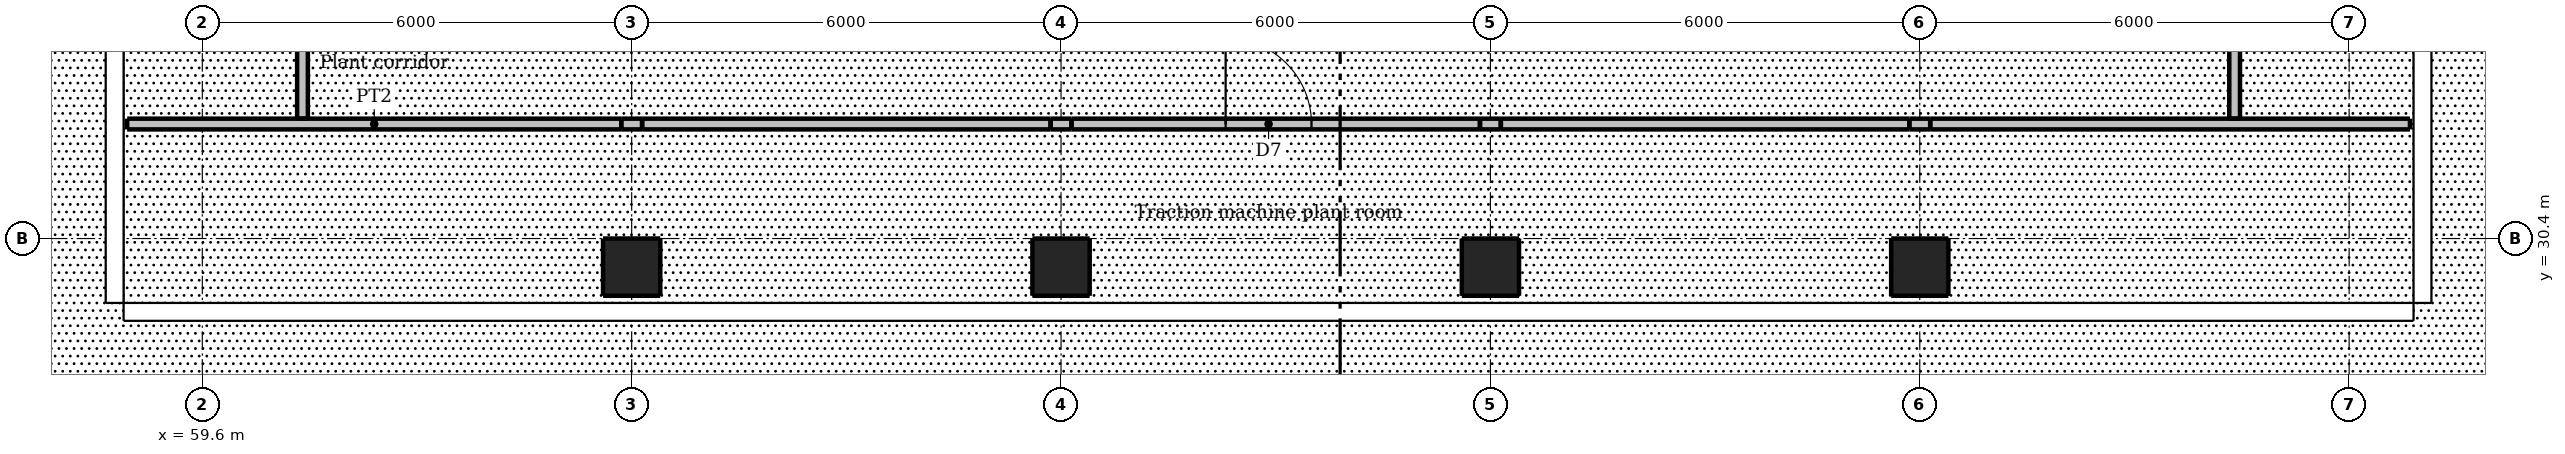
"""IFC4 building model, lengths in metres.
Left out: names, types, materials, properties, quantities, classifications, styles, units other than length and angle.
Written with IfcOpenShell. Run it as: python <this file> out.ifc"""

import sys

from ifc_helpers import new_model, si_unit, direction, frame, frame_2d, origin, origin_2d, place, context, subcontext, project, spatial, rectangle, extrude, element, fill, save


model = new_model("IFC4")
c1 = context("Model", 3, precision=1e-05, world=origin(), true_north=direction((0.0, 1.0)))
c2 = subcontext(c1, "Body", "Model", "MODEL_VIEW")
j1 = project(units=[si_unit("LENGTHUNIT", "METRE"), si_unit("PLANEANGLEUNIT", "RADIAN")], contexts=[c1])
p1 = place(None, origin())
s1 = spatial("IfcSite", under=j1, at=p1, CompositionType="ELEMENT")
p2 = place(p1, origin())
s2 = spatial("IfcBuilding", under=s1, at=p2, CompositionType="ELEMENT")
p3 = place(p2, frame((0.0, 0.0, 294.4)))
s3 = spatial("IfcBuildingStorey", under=s2, at=p3, CompositionType="ELEMENT", Elevation=294.4)
for number, where, z_axis, x_axis in (
    (1, (65.6, 30.0, 0.0), (0.0, 0.0, 1.0), (1.0, 0.0, 0.0)),
    (2, (71.6, 30.0, 0.0), (0.0, 0.0, 1.0), (1.0, 0.0, 0.0)),
    (3, (77.6, 30.0, 0.0), (0.0, 0.0, 1.0), (1.0, 0.0, 0.0)),
    (4, (83.6, 30.0, 0.0), (0.0, 0.0, 1.0), (1.0, 0.0, 0.0)),
):
    element("IfcColumn", number, at=place(p3, frame(where, z_axis=z_axis, x_axis=x_axis)), inside=s3, PredefinedType="COLUMN", context=c2, shape_type="SweptSolid", body=[
        extrude(rectangle(XDim=0.8, YDim=0.8, at=origin_2d()), origin(), (0.0, 0.0, 1.0), 3.3),
    ])
p4 = place(p3, frame((58.55, 32.0, 0.0), z_axis=(0.0, 0.0, 1.0), x_axis=(1.0, 0.0, 0.0)))
e5 = element("IfcWall", 5, at=p4, inside=s3, PredefinedType="PARTITIONING", context=c2, shape_type="SweptSolid", body=[
    extrude(rectangle(XDim=6.904, YDim=0.15, at=frame_2d((3.452, 0.0))), origin(), (0.0, 0.0, 1.0), 3.3),
])
p5 = place(p3, frame((65.454, 32.0, 0.0), z_axis=(0.0, 0.0, 1.0), x_axis=(1.0, 0.0, 0.0)))
e6 = element("IfcWall", 6, at=p5, inside=s3, PredefinedType="PARTITIONING", context=c2, shape_type="SweptSolid", body=[
    extrude(rectangle(XDim=0.292, YDim=0.15, at=frame_2d((0.146, 0.0))), origin(), (0.0, 0.0, 1.0), 2.465),
])
p6 = place(p3, frame((65.746, 32.0, 0.0), z_axis=(0.0, 0.0, 1.0), x_axis=(1.0, 0.0, 0.0)))
e7 = element("IfcWall", 7, at=p6, inside=s3, PredefinedType="PARTITIONING", context=c2, shape_type="SweptSolid", body=[
    extrude(rectangle(XDim=5.708, YDim=0.15, at=frame_2d((2.854, 0.0))), origin(), (0.0, 0.0, 1.0), 3.3),
])
p7 = place(p3, frame((71.454, 32.0, 0.0), z_axis=(0.0, 0.0, 1.0), x_axis=(1.0, 0.0, 0.0)))
e8 = element("IfcWall", 8, at=p7, inside=s3, PredefinedType="PARTITIONING", context=c2, shape_type="SweptSolid", body=[
    extrude(rectangle(XDim=0.292, YDim=0.15, at=frame_2d((0.146, 0.0))), origin(), (0.0, 0.0, 1.0), 2.465),
])
p8 = place(p3, frame((71.746, 32.0, 0.0), z_axis=(0.0, 0.0, 1.0), x_axis=(1.0, 0.0, 0.0)))
e9 = element("IfcWall", 9, at=p8, inside=s3, PredefinedType="PARTITIONING", context=c2, shape_type="SweptSolid", body=[
    extrude(rectangle(XDim=5.708, YDim=0.15, at=frame_2d((2.854, 0.0))), origin(), (0.0, 0.0, 1.0), 3.3),
])
p9 = place(p8, frame((2.154, 0.0, 0.0)))
e10 = element("IfcOpeningElement", 10, at=p9, cuts=e9, PredefinedType="OPENING", context=c2, shape_type="SweptSolid", body=[
    extrude(rectangle(XDim=1.2, YDim=2.1, at=frame_2d((0.6, 1.05))), frame((0.0, 0.085, 0.0), z_axis=(0.0, -1.0, 0.0), x_axis=(1.0, 0.0, 0.0)), (0.0, 0.0, 1.0), 0.17),
])
p10 = place(p3, frame((77.454, 32.0, 0.0), z_axis=(0.0, 0.0, 1.0), x_axis=(1.0, 0.0, 0.0)))
e11 = element("IfcWall", 11, at=p10, inside=s3, PredefinedType="PARTITIONING", context=c2, shape_type="SweptSolid", body=[
    extrude(rectangle(XDim=0.292, YDim=0.15, at=frame_2d((0.146, 0.0))), origin(), (0.0, 0.0, 1.0), 2.465),
])
p11 = place(p3, frame((77.746, 32.0, 0.0), z_axis=(0.0, 0.0, 1.0), x_axis=(1.0, 0.0, 0.0)))
e12 = element("IfcWall", 12, at=p11, inside=s3, PredefinedType="PARTITIONING", context=c2, shape_type="SweptSolid", body=[
    extrude(rectangle(XDim=5.708, YDim=0.15, at=frame_2d((2.854, 0.0))), origin(), (0.0, 0.0, 1.0), 3.3),
])
p12 = place(p3, frame((83.454, 32.0, 0.0), z_axis=(0.0, 0.0, 1.0), x_axis=(1.0, 0.0, 0.0)))
e13 = element("IfcWall", 13, at=p12, inside=s3, PredefinedType="PARTITIONING", context=c2, shape_type="SweptSolid", body=[
    extrude(rectangle(XDim=0.292, YDim=0.15, at=frame_2d((0.146, 0.0))), origin(), (0.0, 0.0, 1.0), 2.465),
])
p13 = place(p3, frame((83.746, 32.0, 0.0), z_axis=(0.0, 0.0, 1.0), x_axis=(1.0, 0.0, 0.0)))
e14 = element("IfcWall", 14, at=p13, inside=s3, PredefinedType="PARTITIONING", context=c2, shape_type="SweptSolid", body=[
    extrude(rectangle(XDim=6.704, YDim=0.15, at=frame_2d((3.352, 0.0))), origin(), (0.0, 0.0, 1.0), 3.3),
])
for number, where, z_axis, x_axis in (
    (15, (61.0, 32.075, 0.0), (0.0, 0.0, 1.0), (0.0, 1.0, 0.0)),
    (16, (88.0, 32.075, 0.0), (0.0, 0.0, 1.0), (0.0, 1.0, 0.0)),
):
    element("IfcWall", number, at=place(p3, frame(where, z_axis=z_axis, x_axis=x_axis)), inside=s3, PredefinedType="PARTITIONING", context=c2, shape_type="SweptSolid", body=[
        extrude(rectangle(XDim=4.179, YDim=0.15, at=frame_2d((2.09, 0.0))), origin(), (0.0, 0.0, 1.0), 3.3),
    ])
p14 = place(p9, origin())
e17 = element("IfcDoor", 17, at=p14, inside=s3, OperationType="SINGLE_SWING_LEFT", PredefinedType="DOOR", context=c2, shape_type="SweptSolid", body=[
    extrude(rectangle(XDim=1.2, YDim=2.1, at=frame_2d((0.6, 1.05))), frame((0.0, 0.025, 0.0), z_axis=(0.0, -1.0, 0.0), x_axis=(1.0, 0.0, 0.0)), (0.0, 0.0, 1.0), 0.05),
])
fill(e10, e17)
save(model, sys.argv[1])
